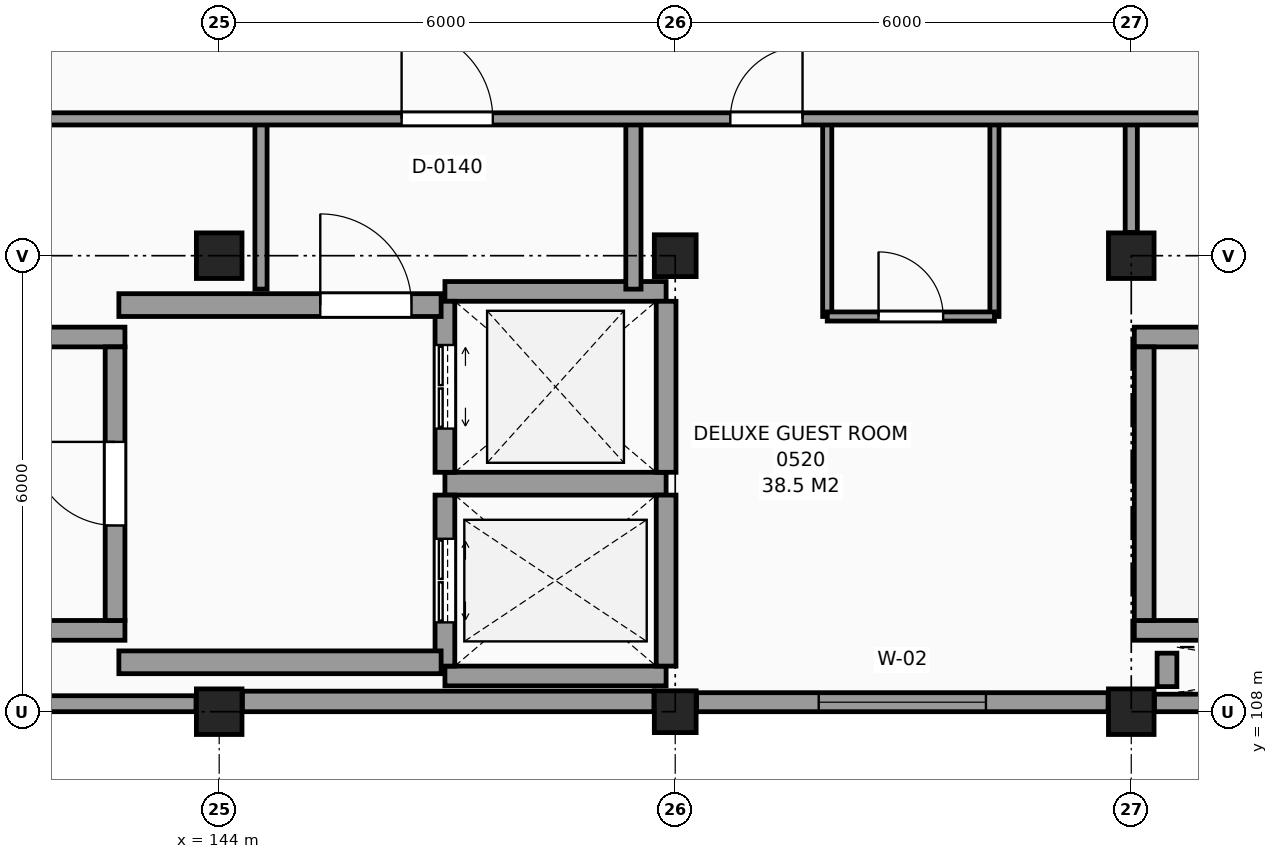
"""IFC4 building model, lengths in metres.
Left out: names, types, materials, properties, quantities, classifications, styles, units other than length and angle.
Written with IfcOpenShell. Run it as: python <this file> out.ifc"""

import sys

from ifc_helpers import new_model, si_unit, direction, frame, frame_2d, origin, origin_2d, place, context, subcontext, project, spatial, rectangle, extrude, element, fill, save


model = new_model("IFC4")
c1 = context("Model", 3, precision=1e-05, world=origin(), true_north=direction((0.0, 1.0)))
c2 = subcontext(c1, "Body", "Model", "MODEL_VIEW")
j1 = project(units=[si_unit("LENGTHUNIT", "METRE"), si_unit("PLANEANGLEUNIT", "RADIAN")], contexts=[c1])
p1 = place(None, origin())
s1 = spatial("IfcSite", under=j1, at=p1, CompositionType="ELEMENT")
p2 = place(p1, origin())
s2 = spatial("IfcBuilding", under=s1, at=p2, CompositionType="ELEMENT")
p3 = place(p2, frame((0.0, 0.0, 24.6)))
s3 = spatial("IfcBuildingStorey", under=s2, at=p3, CompositionType="ELEMENT", Elevation=24.6)
for number, where, z_axis, x_axis in (
    (1, (144.0, 108.0, 0.0), (0.0, 0.0, 1.0), (1.0, 0.0, 0.0)),
    (2, (144.0, 114.0, 0.0), (0.0, 0.0, 1.0), (1.0, 0.0, 0.0)),
):
    element("IfcColumn", number, at=place(p3, frame(where, z_axis=z_axis, x_axis=x_axis)), inside=s3, PredefinedType="COLUMN", context=c2, shape_type="SweptSolid", body=[
        extrude(rectangle(XDim=0.6, YDim=0.6, at=origin_2d()), origin(), (0.0, 0.0, 1.0), 3.6),
    ])
for number, where, z_axis, x_axis in (
    (3, (150.0, 108.0, 0.0), (0.0, 0.0, 1.0), (1.0, 0.0, 0.0)),
    (4, (150.0, 114.0, 0.0), (0.0, 0.0, 1.0), (1.0, 0.0, 0.0)),
):
    element("IfcColumn", number, at=place(p3, frame(where, z_axis=z_axis, x_axis=x_axis)), inside=s3, PredefinedType="COLUMN", context=c2, shape_type="SweptSolid", body=[
        extrude(rectangle(XDim=0.55, YDim=0.55, at=origin_2d()), origin(), (0.0, 0.0, 1.0), 3.6),
    ])
for number, where, z_axis, x_axis in (
    (5, (156.0, 108.0, 0.0), (0.0, 0.0, 1.0), (1.0, 0.0, 0.0)),
    (6, (156.0, 114.0, 0.0), (0.0, 0.0, 1.0), (1.0, 0.0, 0.0)),
):
    element("IfcColumn", number, at=place(p3, frame(where, z_axis=z_axis, x_axis=x_axis)), inside=s3, PredefinedType="COLUMN", context=c2, shape_type="SweptSolid", body=[
        extrude(rectangle(XDim=0.6, YDim=0.6, at=origin_2d()), origin(), (0.0, 0.0, 1.0), 3.6),
    ])
p4 = place(p3, frame((138.28, 108.105, 0.0), z_axis=(0.0, 0.0, 1.0), x_axis=(1.0, 0.0, 0.0)))
e7 = element("IfcWall", 7, at=p4, inside=s3, PredefinedType="SOLIDWALL", context=c2, shape_type="SweptSolid", body=[
    extrude(rectangle(XDim=5.415, YDim=0.21, at=frame_2d((2.708, 0.0))), origin(), (0.0, 0.0, 1.0), 2.73),
])
p5 = place(p3, frame((144.305, 108.135, 0.0), z_axis=(0.0, 0.0, 1.0), x_axis=(1.0, 0.0, 0.0)))
e8 = element("IfcWall", 8, at=p5, inside=s3, PredefinedType="SOLIDWALL", context=c2, shape_type="SweptSolid", body=[
    extrude(rectangle(XDim=5.415, YDim=0.27, at=frame_2d((2.708, 0.0))), origin(), (0.0, 0.0, 1.0), 2.73),
])
p6 = place(p3, frame((150.28, 108.125, 0.0), z_axis=(0.0, 0.0, 1.0), x_axis=(1.0, 0.0, 0.0)))
e9 = element("IfcWall", 9, at=p6, inside=s3, PredefinedType="SOLIDWALL", context=c2, shape_type="SweptSolid", body=[
    extrude(rectangle(XDim=5.415, YDim=0.25, at=frame_2d((2.708, 0.0))), origin(), (0.0, 0.0, 1.0), 2.73),
])
p7 = place(p6, frame((1.608, 0.0, 0.8)))
e10 = element("IfcOpeningElement", 10, at=p7, cuts=e9, PredefinedType="OPENING", context=c2, shape_type="SweptSolid", body=[
    extrude(rectangle(XDim=2.2, YDim=1.75, at=frame_2d((1.1, 0.875))), frame((0.0, 0.135, 0.0), z_axis=(0.0, -1.0, 0.0), x_axis=(1.0, 0.0, 0.0)), (0.0, 0.0, 1.0), 0.27),
])
p8 = place(p3, frame((156.305, 108.115, 0.0), z_axis=(0.0, 0.0, 1.0), x_axis=(1.0, 0.0, 0.0)))
e11 = element("IfcWall", 11, at=p8, inside=s3, PredefinedType="SOLIDWALL", context=c2, shape_type="SweptSolid", body=[
    extrude(rectangle(XDim=5.415, YDim=0.23, at=frame_2d((2.708, 0.0))), origin(), (0.0, 0.0, 1.0), 3.38),
])
for number, where, z_axis, x_axis in (
    (12, (156.04, 109.07, 0.0), (0.0, 0.0, 1.0), (1.0, 0.0, 0.0)),
    (13, (156.04, 112.93, 0.0), (0.0, 0.0, 1.0), (1.0, 0.0, 0.0)),
):
    element("IfcWall", number, at=place(p3, frame(where, z_axis=z_axis, x_axis=x_axis)), inside=s3, PredefinedType="SHEAR", context=c2, shape_type="SweptSolid", body=[
        extrude(rectangle(XDim=10.72, YDim=0.26, at=frame_2d((5.36, 0.0))), origin(), (0.0, 0.0, 1.0), 3.6),
    ])
p9 = place(p3, frame((156.17, 109.2, 0.0), z_axis=(0.0, 0.0, 1.0), x_axis=(0.0, 1.0, 0.0)))
e14 = element("IfcWall", 14, at=p9, inside=s3, PredefinedType="SHEAR", context=c2, shape_type="SweptSolid", body=[
    extrude(rectangle(XDim=3.6, YDim=0.26, at=frame_2d((1.8, 0.0))), origin(), (0.0, 0.0, 1.0), 3.6),
])
p10 = place(p3, frame((156.47, 108.33, 0.0), z_axis=(0.0, 0.0, 1.0), x_axis=(0.0, 1.0, 0.0)))
e15 = element("IfcWall", 15, at=p10, inside=s3, PredefinedType="SHEAR", context=c2, shape_type="SweptSolid", body=[
    extrude(rectangle(XDim=0.44, YDim=0.26, at=frame_2d((0.22, 0.0))), origin(), (0.0, 0.0, 1.0), 3.6),
])
for number, where, z_axis, x_axis in (
    (16, (132.04, 109.07, 0.0), (0.0, 0.0, 1.0), (1.0, 0.0, 0.0)),
    (17, (132.04, 112.93, 0.0), (0.0, 0.0, 1.0), (1.0, 0.0, 0.0)),
):
    element("IfcWall", number, at=place(p3, frame(where, z_axis=z_axis, x_axis=x_axis)), inside=s3, PredefinedType="SHEAR", context=c2, shape_type="SweptSolid", body=[
        extrude(rectangle(XDim=10.72, YDim=0.26, at=frame_2d((5.36, 0.0))), origin(), (0.0, 0.0, 1.0), 3.6),
    ])
p11 = place(p3, frame((142.63, 109.2, 0.0), z_axis=(0.0, 0.0, 1.0), x_axis=(0.0, 1.0, 0.0)))
e18 = element("IfcWall", 18, at=p11, inside=s3, PredefinedType="SHEAR", context=c2, shape_type="SweptSolid", body=[
    extrude(rectangle(XDim=3.6, YDim=0.26, at=frame_2d((1.8, 0.0))), origin(), (0.0, 0.0, 1.0), 3.6),
])
p12 = place(p11, frame((1.25, 0.0, 0.0)))
e19 = element("IfcOpeningElement", 19, at=p12, cuts=e18, PredefinedType="OPENING", context=c2, shape_type="SweptSolid", body=[
    extrude(rectangle(XDim=1.1, YDim=2.15, at=frame_2d((0.55, 1.075))), frame((0.0, 0.14, 0.0), z_axis=(0.0, -1.0, 0.0), x_axis=(1.0, 0.0, 0.0)), (0.0, 0.0, 1.0), 0.28),
])
p13 = place(p3, frame((146.97, 108.47, 0.0), z_axis=(0.0, 0.0, 1.0), x_axis=(1.0, 0.0, 0.0)))
e20 = element("IfcWall", 20, at=p13, inside=s3, PredefinedType="SHEAR", context=c2, shape_type="SweptSolid", body=[
    extrude(rectangle(XDim=2.91, YDim=0.26, at=frame_2d((1.455, 0.0))), origin(), (0.0, 0.0, 1.0), 3.6),
])
p14 = place(p3, frame((146.97, 111.0, 0.0), z_axis=(0.0, 0.0, 1.0), x_axis=(1.0, 0.0, 0.0)))
e21 = element("IfcWall", 21, at=p14, inside=s3, PredefinedType="SHEAR", context=c2, shape_type="SweptSolid", body=[
    extrude(rectangle(XDim=2.91, YDim=0.3, at=frame_2d((1.455, 0.0))), origin(), (0.0, 0.0, 1.0), 3.6),
])
p15 = place(p3, frame((149.88, 108.6, 0.0), z_axis=(0.0, 0.0, 1.0), x_axis=(0.0, 1.0, 0.0)))
e22 = element("IfcWall", 22, at=p15, inside=s3, PredefinedType="SHEAR", context=c2, shape_type="SweptSolid", body=[
    extrude(rectangle(XDim=2.25, YDim=0.26, at=frame_2d((1.125, 0.0))), origin(), (0.0, 0.0, 1.0), 3.6),
])
p16 = place(p3, frame((146.97, 108.6, 0.0), z_axis=(0.0, 0.0, 1.0), x_axis=(0.0, 1.0, 0.0)))
e23 = element("IfcWall", 23, at=p16, inside=s3, PredefinedType="SHEAR", context=c2, shape_type="SweptSolid", body=[
    extrude(rectangle(XDim=2.25, YDim=0.26, at=frame_2d((1.125, 0.0))), origin(), (0.0, 0.0, 1.0), 3.6),
])
p17 = place(p16, frame((0.575, 0.0, 0.0)))
e24 = element("IfcOpeningElement", 24, at=p17, cuts=e23, PredefinedType="OPENING", context=c2, shape_type="SweptSolid", body=[
    extrude(rectangle(XDim=1.1, YDim=2.2, at=frame_2d((0.55, 1.1))), frame((0.0, 0.14, 0.0), z_axis=(0.0, -1.0, 0.0), x_axis=(1.0, 0.0, 0.0)), (0.0, 0.0, 1.0), 0.28),
])
p18 = place(p3, frame((146.97, 113.53, 0.0), z_axis=(0.0, 0.0, 1.0), x_axis=(1.0, 0.0, 0.0)))
e25 = element("IfcWall", 25, at=p18, inside=s3, PredefinedType="SHEAR", context=c2, shape_type="SweptSolid", body=[
    extrude(rectangle(XDim=2.91, YDim=0.26, at=frame_2d((1.455, 0.0))), origin(), (0.0, 0.0, 1.0), 3.6),
])
p19 = place(p3, frame((149.88, 111.15, 0.0), z_axis=(0.0, 0.0, 1.0), x_axis=(0.0, 1.0, 0.0)))
e26 = element("IfcWall", 26, at=p19, inside=s3, PredefinedType="SHEAR", context=c2, shape_type="SweptSolid", body=[
    extrude(rectangle(XDim=2.25, YDim=0.26, at=frame_2d((1.125, 0.0))), origin(), (0.0, 0.0, 1.0), 3.6),
])
p20 = place(p3, frame((146.97, 111.15, 0.0), z_axis=(0.0, 0.0, 1.0), x_axis=(0.0, 1.0, 0.0)))
e27 = element("IfcWall", 27, at=p20, inside=s3, PredefinedType="SHEAR", context=c2, shape_type="SweptSolid", body=[
    extrude(rectangle(XDim=2.25, YDim=0.26, at=frame_2d((1.125, 0.0))), origin(), (0.0, 0.0, 1.0), 3.6),
])
p21 = place(p20, frame((0.575, 0.0, 0.0)))
e28 = element("IfcOpeningElement", 28, at=p21, cuts=e27, PredefinedType="OPENING", context=c2, shape_type="SweptSolid", body=[
    extrude(rectangle(XDim=1.1, YDim=2.2, at=frame_2d((0.55, 1.1))), frame((0.0, 0.14, 0.0), z_axis=(0.0, -1.0, 0.0), x_axis=(1.0, 0.0, 0.0)), (0.0, 0.0, 1.0), 0.28),
])
p22 = place(p3, frame((142.68, 113.35, 0.0), z_axis=(0.0, 0.0, 1.0), x_axis=(1.0, 0.0, 0.0)))
e29 = element("IfcWall", 29, at=p22, inside=s3, PredefinedType="SHEAR", context=c2, shape_type="SweptSolid", body=[
    extrude(rectangle(XDim=4.24, YDim=0.3, at=frame_2d((2.12, 0.0))), origin(), (0.0, 0.0, 1.0), 3.6),
])
p23 = place(p22, frame((2.65, 0.0, 0.0)))
e30 = element("IfcOpeningElement", 30, at=p23, cuts=e29, PredefinedType="OPENING", context=c2, shape_type="SweptSolid", body=[
    extrude(rectangle(XDim=1.2, YDim=2.2, at=frame_2d((0.6, 1.1))), frame((0.0, 0.16, 0.0), z_axis=(0.0, -1.0, 0.0), x_axis=(1.0, 0.0, 0.0)), (0.0, 0.0, 1.0), 0.32),
])
p24 = place(p3, frame((142.68, 108.65, 0.0), z_axis=(0.0, 0.0, 1.0), x_axis=(1.0, 0.0, 0.0)))
e31 = element("IfcWall", 31, at=p24, inside=s3, PredefinedType="SHEAR", context=c2, shape_type="SweptSolid", body=[
    extrude(rectangle(XDim=4.24, YDim=0.3, at=frame_2d((2.12, 0.0))), origin(), (0.0, 0.0, 1.0), 3.6),
])
p25 = place(p3, frame((144.55, 113.56, 0.0), z_axis=(0.0, 0.0, 1.0), x_axis=(0.0, 1.0, 0.0)))
e32 = element("IfcWall", 32, at=p25, inside=s3, PredefinedType="PARTITIONING", context=c2, shape_type="SweptSolid", body=[
    extrude(rectangle(XDim=2.24, YDim=0.16, at=frame_2d((1.12, 0.0))), origin(), (0.0, 0.0, 1.0), 3.38),
])
p26 = place(p3, frame((149.45, 113.56, 0.0), z_axis=(0.0, 0.0, 1.0), x_axis=(0.0, 1.0, 0.0)))
e33 = element("IfcWall", 33, at=p26, inside=s3, PredefinedType="PARTITIONING", context=c2, shape_type="SweptSolid", body=[
    extrude(rectangle(XDim=2.24, YDim=0.2, at=frame_2d((1.12, 0.0))), origin(), (0.0, 0.0, 1.0), 3.38),
])
for number, where, z_axis, x_axis in (
    (34, (152.0, 113.2, 0.0), (0.0, 0.0, 1.0), (0.0, 1.0, 0.0)),
    (35, (154.2, 113.2, 0.0), (0.0, 0.0, 1.0), (0.0, 1.0, 0.0)),
):
    element("IfcWall", number, at=place(p3, frame(where, z_axis=z_axis, x_axis=x_axis)), inside=s3, PredefinedType="PARTITIONING", context=c2, shape_type="SweptSolid", body=[
        extrude(rectangle(XDim=2.6, YDim=0.12, at=frame_2d((1.3, 0.0))), origin(), (0.0, 0.0, 1.0), 3.38),
    ])
p27 = place(p3, frame((156.0, 114.305, 0.0), z_axis=(0.0, 0.0, 1.0), x_axis=(0.0, 1.0, 0.0)))
e36 = element("IfcWall", 36, at=p27, inside=s3, PredefinedType="PARTITIONING", context=c2, shape_type="SweptSolid", body=[
    extrude(rectangle(XDim=1.495, YDim=0.16, at=frame_2d((0.748, 0.0))), origin(), (0.0, 0.0, 1.0), 2.58),
])
p28 = place(p3, frame((152.0, 113.2, 0.0), z_axis=(0.0, 0.0, 1.0), x_axis=(1.0, 0.0, 0.0)))
e37 = element("IfcWall", 37, at=p28, inside=s3, PredefinedType="PARTITIONING", context=c2, shape_type="SweptSolid", body=[
    extrude(rectangle(XDim=2.2, YDim=0.12, at=frame_2d((1.1, 0.0))), origin(), (0.0, 0.0, 1.0), 3.38),
])
p29 = place(p28, frame((0.675, 0.0, 0.0)))
e38 = element("IfcOpeningElement", 38, at=p29, cuts=e37, PredefinedType="OPENING", context=c2, shape_type="SweptSolid", body=[
    extrude(rectangle(XDim=0.85, YDim=2.1, at=frame_2d((0.425, 1.05))), frame((0.0, 0.07, 0.0), z_axis=(0.0, -1.0, 0.0), x_axis=(1.0, 0.0, 0.0)), (0.0, 0.0, 1.0), 0.14),
])
p30 = place(p3, frame((66.255, 115.8, 0.0), z_axis=(0.0, 0.0, 1.0), x_axis=(1.0, 0.0, 0.0)))
e39 = element("IfcWall", 39, at=p30, inside=s3, PredefinedType="PARTITIONING", context=c2, shape_type="SweptSolid", body=[
    extrude(rectangle(XDim=103.545, YDim=0.16, at=frame_2d((51.772, 0.0))), origin(), (0.0, 0.0, 1.0), 3.38),
])
p31 = place(p30, frame((80.145, 0.0, 0.0)))
e40 = element("IfcOpeningElement", 40, at=p31, cuts=e39, PredefinedType="OPENING", context=c2, shape_type="SweptSolid", body=[
    extrude(rectangle(XDim=1.2, YDim=2.2, at=frame_2d((0.6, 1.1))), frame((0.0, 0.09, 0.0), z_axis=(0.0, -1.0, 0.0), x_axis=(1.0, 0.0, 0.0)), (0.0, 0.0, 1.0), 0.18),
])
p32 = place(p30, frame((50.145, 0.0, 0.0)))
e41 = element("IfcOpeningElement", 41, at=p32, cuts=e39, PredefinedType="OPENING", context=c2, shape_type="SweptSolid", body=[
    extrude(rectangle(XDim=1.2, YDim=2.2, at=frame_2d((0.6, 1.1))), frame((0.0, 0.09, 0.0), z_axis=(0.0, -1.0, 0.0), x_axis=(1.0, 0.0, 0.0)), (0.0, 0.0, 1.0), 0.18),
])
p33 = place(p30, frame((8.995, 0.0, 0.0)))
e42 = element("IfcOpeningElement", 42, at=p33, cuts=e39, PredefinedType="OPENING", context=c2, shape_type="SweptSolid", body=[
    extrude(rectangle(XDim=1.1, YDim=2.15, at=frame_2d((0.55, 1.075))), frame((0.0, 0.09, 0.0), z_axis=(0.0, -1.0, 0.0), x_axis=(1.0, 0.0, 0.0)), (0.0, 0.0, 1.0), 0.18),
])
p34 = place(p30, frame((55.295, 0.0, 0.0)))
e43 = element("IfcOpeningElement", 43, at=p34, cuts=e39, PredefinedType="OPENING", context=c2, shape_type="SweptSolid", body=[
    extrude(rectangle(XDim=1.0, YDim=2.15, at=frame_2d((0.5, 1.075))), frame((0.0, 0.09, 0.0), z_axis=(0.0, -1.0, 0.0), x_axis=(1.0, 0.0, 0.0)), (0.0, 0.0, 1.0), 0.18),
])
p35 = place(p30, frame((62.265, 0.0, 0.0)))
e44 = element("IfcOpeningElement", 44, at=p35, cuts=e39, PredefinedType="OPENING", context=c2, shape_type="SweptSolid", body=[
    extrude(rectangle(XDim=0.96, YDim=2.15, at=frame_2d((0.48, 1.075))), frame((0.0, 0.09, 0.0), z_axis=(0.0, -1.0, 0.0), x_axis=(1.0, 0.0, 0.0)), (0.0, 0.0, 1.0), 0.18),
])
p36 = place(p30, frame((31.945, 0.0, 0.0)))
e45 = element("IfcOpeningElement", 45, at=p36, cuts=e39, PredefinedType="OPENING", context=c2, shape_type="SweptSolid", body=[
    extrude(rectangle(XDim=1.6, YDim=2.25, at=frame_2d((0.8, 1.125))), frame((0.0, 0.09, 0.0), z_axis=(0.0, -1.0, 0.0), x_axis=(1.0, 0.0, 0.0)), (0.0, 0.0, 1.0), 0.18),
])
p37 = place(p30, frame((18.57, 0.0, 0.0)))
e46 = element("IfcOpeningElement", 46, at=p37, cuts=e39, PredefinedType="OPENING", context=c2, shape_type="SweptSolid", body=[
    extrude(rectangle(XDim=0.95, YDim=2.1, at=frame_2d((0.475, 1.05))), frame((0.0, 0.09, 0.0), z_axis=(0.0, -1.0, 0.0), x_axis=(1.0, 0.0, 0.0)), (0.0, 0.0, 1.0), 0.18),
])
p38 = place(p30, frame((24.57, 0.0, 0.0)))
e47 = element("IfcOpeningElement", 47, at=p38, cuts=e39, PredefinedType="OPENING", context=c2, shape_type="SweptSolid", body=[
    extrude(rectangle(XDim=0.95, YDim=2.1, at=frame_2d((0.475, 1.05))), frame((0.0, 0.09, 0.0), z_axis=(0.0, -1.0, 0.0), x_axis=(1.0, 0.0, 0.0)), (0.0, 0.0, 1.0), 0.18),
])
p39 = place(p30, frame((84.47, 0.0, 0.0)))
e48 = element("IfcOpeningElement", 48, at=p39, cuts=e39, PredefinedType="OPENING", context=c2, shape_type="SweptSolid", body=[
    extrude(rectangle(XDim=0.95, YDim=2.1, at=frame_2d((0.475, 1.05))), frame((0.0, 0.09, 0.0), z_axis=(0.0, -1.0, 0.0), x_axis=(1.0, 0.0, 0.0)), (0.0, 0.0, 1.0), 0.18),
])
p40 = place(p7, origin())
e49 = element("IfcWindow", 49, at=p40, inside=s3, PartitioningType="SINGLE_PANEL", PredefinedType="WINDOW", context=c2, shape_type="SweptSolid", body=[
    extrude(rectangle(XDim=2.2, YDim=1.75, at=frame_2d((1.1, 0.875))), frame((0.0, 0.03, 0.0), z_axis=(0.0, -1.0, 0.0), x_axis=(1.0, 0.0, 0.0)), (0.0, 0.0, 1.0), 0.06),
])
fill(e10, e49)
p41 = place(p12, origin())
e50 = element("IfcDoor", 50, at=p41, inside=s3, OperationType="SINGLE_SWING_RIGHT", PredefinedType="DOOR", context=c2, shape_type="SweptSolid", body=[
    extrude(rectangle(XDim=1.1, YDim=2.15, at=frame_2d((0.55, 1.075))), frame((0.0, 0.025, 0.0), z_axis=(0.0, -1.0, 0.0), x_axis=(1.0, 0.0, 0.0)), (0.0, 0.0, 1.0), 0.05),
])
fill(e19, e50)
p42 = place(p17, origin())
e51 = element("IfcDoor", 51, at=p42, inside=s3, OperationType="DOUBLE_DOOR_SLIDING", PredefinedType="DOOR", context=c2, shape_type="SweptSolid", body=[
    extrude(rectangle(XDim=1.1, YDim=2.2, at=frame_2d((0.55, 1.1))), frame((0.0, 0.025, 0.0), z_axis=(0.0, -1.0, 0.0), x_axis=(1.0, 0.0, 0.0)), (0.0, 0.0, 1.0), 0.05),
])
fill(e24, e51)
p43 = place(p21, origin())
e52 = element("IfcDoor", 52, at=p43, inside=s3, OperationType="DOUBLE_DOOR_SLIDING", PredefinedType="DOOR", context=c2, shape_type="SweptSolid", body=[
    extrude(rectangle(XDim=1.1, YDim=2.2, at=frame_2d((0.55, 1.1))), frame((0.0, 0.025, 0.0), z_axis=(0.0, -1.0, 0.0), x_axis=(1.0, 0.0, 0.0)), (0.0, 0.0, 1.0), 0.05),
])
fill(e28, e52)
p44 = place(p23, origin())
e53 = element("IfcDoor", 53, at=p44, inside=s3, OperationType="SINGLE_SWING_LEFT", PredefinedType="DOOR", context=c2, shape_type="SweptSolid", body=[
    extrude(rectangle(XDim=1.2, YDim=2.2, at=frame_2d((0.6, 1.1))), frame((0.0, 0.025, 0.0), z_axis=(0.0, -1.0, 0.0), x_axis=(1.0, 0.0, 0.0)), (0.0, 0.0, 1.0), 0.05),
])
fill(e30, e53)
p45 = place(p31, origin())
e54 = element("IfcDoor", 54, at=p45, inside=s3, OperationType="SINGLE_SWING_LEFT", PredefinedType="DOOR", context=c2, shape_type="SweptSolid", body=[
    extrude(rectangle(XDim=1.2, YDim=2.2, at=frame_2d((0.6, 1.1))), frame((0.0, 0.025, 0.0), z_axis=(0.0, -1.0, 0.0), x_axis=(1.0, 0.0, 0.0)), (0.0, 0.0, 1.0), 0.05),
])
fill(e40, e54)
p46 = place(p29, origin())
e55 = element("IfcDoor", 55, at=p46, inside=s3, OperationType="SINGLE_SWING_LEFT", PredefinedType="DOOR", context=c2, shape_type="SweptSolid", body=[
    extrude(rectangle(XDim=0.85, YDim=2.1, at=frame_2d((0.425, 1.05))), frame((0.0, 0.025, 0.0), z_axis=(0.0, -1.0, 0.0), x_axis=(1.0, 0.0, 0.0)), (0.0, 0.0, 1.0), 0.05),
])
fill(e38, e55)
p47 = place(p39, origin())
e56 = element("IfcDoor", 56, at=p47, inside=s3, OperationType="SINGLE_SWING_RIGHT", PredefinedType="DOOR", context=c2, shape_type="SweptSolid", body=[
    extrude(rectangle(XDim=0.95, YDim=2.1, at=frame_2d((0.475, 1.05))), frame((0.0, 0.025, 0.0), z_axis=(0.0, -1.0, 0.0), x_axis=(1.0, 0.0, 0.0)), (0.0, 0.0, 1.0), 0.05),
])
fill(e48, e56)
save(model, sys.argv[1])
